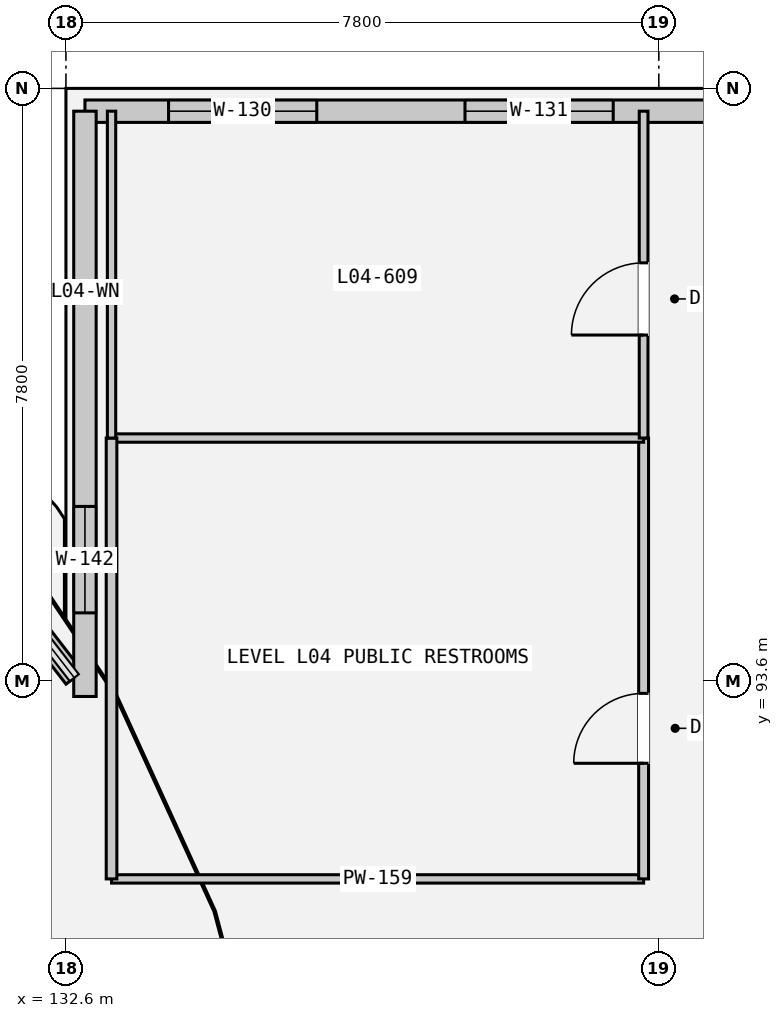
"""IFC4 building model, lengths in metres.
Left out: names, types, materials, properties, quantities, classifications, styles, units other than length and angle.
Written with IfcOpenShell. Run it as: python <this file> out.ifc"""

import sys

from ifc_helpers import new_model, si_unit, direction, frame, frame_2d, origin, place, context, subcontext, project, spatial, rectangle, extrude, element, fill, save


model = new_model("IFC4")
c1 = context("Model", 3, precision=1e-05, world=origin(), true_north=direction((0.0, 1.0)))
c2 = subcontext(c1, "Body", "Model", "MODEL_VIEW")
j1 = project(units=[si_unit("LENGTHUNIT", "METRE"), si_unit("PLANEANGLEUNIT", "RADIAN")], contexts=[c1])
p1 = place(None, origin())
s1 = spatial("IfcSite", under=j1, at=p1, CompositionType="ELEMENT")
p2 = place(p1, origin())
s2 = spatial("IfcBuilding", under=s1, at=p2, CompositionType="ELEMENT")
p3 = place(p2, frame((0.0, 0.0, 19.8)))
s3 = spatial("IfcBuildingStorey", under=s2, at=p3, CompositionType="ELEMENT", Elevation=19.8)
p4 = place(p3, frame((132.71, 93.646, 0.0), z_axis=(0.0, 0.0, 1.0), x_axis=(-0.611576816245, 0.791185059156, 0.0)))
e1 = element("IfcWall", 1, at=p4, inside=s3, PredefinedType="SOLIDWALL", context=c2, shape_type="SweptSolid", body=[
    extrude(rectangle(XDim=4.997, YDim=0.275, at=frame_2d((2.499, 0.0))), origin(), (0.0, 0.0, 1.0), 1.02),
])
p5 = place(p3, frame((132.85, 101.1, 0.0), z_axis=(0.0, 0.0, 1.0), x_axis=(1.0, 0.0, 0.0)))
e2 = element("IfcWall", 2, at=p5, inside=s3, PredefinedType="SOLIDWALL", context=c2, shape_type="SweptSolid", body=[
    extrude(rectangle(XDim=24.05, YDim=0.295, at=frame_2d((12.025, 0.0))), origin(), (0.0, 0.0, 1.0), 3.57),
])
p6 = place(p5, frame((1.1, 0.0, 0.78)))
e3 = element("IfcOpeningElement", 3, at=p6, cuts=e2, PredefinedType="OPENING", context=c2, shape_type="SweptSolid", body=[
    extrude(rectangle(XDim=1.95, YDim=1.8, at=frame_2d((0.975, 0.9))), frame((0.0, 0.157, 0.0), z_axis=(0.0, -1.0, 0.0), x_axis=(1.0, 0.0, 0.0)), (0.0, 0.0, 1.0), 0.315),
])
p7 = place(p5, frame((5.0, 0.0, 0.78)))
e4 = element("IfcOpeningElement", 4, at=p7, cuts=e2, PredefinedType="OPENING", context=c2, shape_type="SweptSolid", body=[
    extrude(rectangle(XDim=1.95, YDim=1.8, at=frame_2d((0.975, 0.9))), frame((0.0, 0.157, 0.0), z_axis=(0.0, -1.0, 0.0), x_axis=(1.0, 0.0, 0.0)), (0.0, 0.0, 1.0), 0.315),
])
p8 = place(p5, frame((8.9, 0.0, 0.78)))
e5 = element("IfcOpeningElement", 5, at=p8, cuts=e2, PredefinedType="OPENING", context=c2, shape_type="SweptSolid", body=[
    extrude(rectangle(XDim=1.95, YDim=1.8, at=frame_2d((0.975, 0.9))), frame((0.0, 0.157, 0.0), z_axis=(0.0, -1.0, 0.0), x_axis=(1.0, 0.0, 0.0)), (0.0, 0.0, 1.0), 0.315),
])
p9 = place(p5, frame((12.8, 0.0, 0.78)))
e6 = element("IfcOpeningElement", 6, at=p9, cuts=e2, PredefinedType="OPENING", context=c2, shape_type="SweptSolid", body=[
    extrude(rectangle(XDim=1.95, YDim=1.8, at=frame_2d((0.975, 0.9))), frame((0.0, 0.157, 0.0), z_axis=(0.0, -1.0, 0.0), x_axis=(1.0, 0.0, 0.0)), (0.0, 0.0, 1.0), 0.315),
])
p10 = place(p5, frame((16.7, 0.0, 0.78)))
e7 = element("IfcOpeningElement", 7, at=p10, cuts=e2, PredefinedType="OPENING", context=c2, shape_type="SweptSolid", body=[
    extrude(rectangle(XDim=1.95, YDim=1.8, at=frame_2d((0.975, 0.9))), frame((0.0, 0.157, 0.0), z_axis=(0.0, -1.0, 0.0), x_axis=(1.0, 0.0, 0.0)), (0.0, 0.0, 1.0), 0.315),
])
p11 = place(p3, frame((132.85, 93.4, 0.0), z_axis=(0.0, 0.0, 1.0), x_axis=(0.0, 1.0, 0.0)))
e8 = element("IfcWall", 8, at=p11, inside=s3, PredefinedType="SOLIDWALL", context=c2, shape_type="SweptSolid", body=[
    extrude(rectangle(XDim=7.7, YDim=0.295, at=frame_2d((3.85, 0.0))), origin(), (0.0, 0.0, 1.0), 3.57),
])
p12 = place(p11, frame((1.1, 0.0, 0.78)))
e9 = element("IfcOpeningElement", 9, at=p12, cuts=e8, PredefinedType="OPENING", context=c2, shape_type="SweptSolid", body=[
    extrude(rectangle(XDim=1.4, YDim=1.4, at=frame_2d((0.7, 0.7))), frame((0.0, 0.157, 0.0), z_axis=(0.0, -1.0, 0.0), x_axis=(1.0, 0.0, 0.0)), (0.0, 0.0, 1.0), 0.315),
])
p13 = place(p3, frame((133.2, 91.0, 0.0), z_axis=(0.0, 0.0, 1.0), x_axis=(1.0, 0.0, 0.0)))
e10 = element("IfcWall", 10, at=p13, inside=s3, PredefinedType="PARTITIONING", context=c2, shape_type="SweptSolid", body=[
    extrude(rectangle(XDim=7.0, YDim=0.11, at=frame_2d((3.5, 0.0))), origin(), (0.0, 0.0, 1.0), 3.45),
])
p14 = place(p3, frame((140.2, 91.0, 0.0), z_axis=(0.0, 0.0, 1.0), x_axis=(0.0, 1.0, 0.0)))
e11 = element("IfcWall", 11, at=p14, inside=s3, PredefinedType="PARTITIONING", context=c2, shape_type="SweptSolid", body=[
    extrude(rectangle(XDim=5.8, YDim=0.13, at=frame_2d((2.9, 0.0))), origin(), (0.0, 0.0, 1.0), 3.45),
])
p15 = place(p14, frame((1.521, 0.0, 0.0)))
e12 = element("IfcOpeningElement", 12, at=p15, cuts=e11, PredefinedType="OPENING", context=c2, shape_type="SweptSolid", body=[
    extrude(rectangle(XDim=0.92, YDim=2.1, at=frame_2d((0.46, 1.05))), frame((0.0, 0.075, 0.0), z_axis=(0.0, -1.0, 0.0), x_axis=(1.0, 0.0, 0.0)), (0.0, 0.0, 1.0), 0.15),
])
p16 = place(p3, frame((140.2, 96.8, 0.0), z_axis=(0.0, 0.0, 1.0), x_axis=(-1.0, 0.0, 0.0)))
e13 = element("IfcWall", 13, at=p16, inside=s3, PredefinedType="PARTITIONING", context=c2, shape_type="SweptSolid", body=[
    extrude(rectangle(XDim=7.0, YDim=0.11, at=frame_2d((3.5, 0.0))), origin(), (0.0, 0.0, 1.0), 3.45),
])
p17 = place(p3, frame((133.2, 96.8, 0.0), z_axis=(0.0, 0.0, 1.0), x_axis=(0.0, -1.0, 0.0)))
e14 = element("IfcWall", 14, at=p17, inside=s3, PredefinedType="PARTITIONING", context=c2, shape_type="SweptSolid", body=[
    extrude(rectangle(XDim=5.8, YDim=0.14, at=frame_2d((2.9, 0.0))), origin(), (0.0, 0.0, 1.0), 3.45),
])
p18 = place(p3, frame((140.2, 96.8, 0.0), z_axis=(0.0, 0.0, 1.0), x_axis=(0.0, 1.0, 0.0)))
e15 = element("IfcWall", 15, at=p18, inside=s3, PredefinedType="PARTITIONING", context=c2, shape_type="SweptSolid", body=[
    extrude(rectangle(XDim=4.3, YDim=0.115, at=frame_2d((2.15, 0.0))), origin(), (0.0, 0.0, 1.0), 3.45),
])
p19 = place(p18, frame((1.355, 0.0, 0.0)))
e16 = element("IfcOpeningElement", 16, at=p19, cuts=e15, PredefinedType="OPENING", context=c2, shape_type="SweptSolid", body=[
    extrude(rectangle(XDim=0.95, YDim=2.1, at=frame_2d((0.475, 1.05))), frame((0.0, 0.067, 0.0), z_axis=(0.0, -1.0, 0.0), x_axis=(1.0, 0.0, 0.0)), (0.0, 0.0, 1.0), 0.135),
])
p20 = place(p3, frame((133.2, 101.1, 0.0), z_axis=(0.0, 0.0, 1.0), x_axis=(0.0, -1.0, 0.0)))
e17 = element("IfcWall", 17, at=p20, inside=s3, PredefinedType="PARTITIONING", context=c2, shape_type="SweptSolid", body=[
    extrude(rectangle(XDim=4.3, YDim=0.11, at=frame_2d((2.15, 0.0))), origin(), (0.0, 0.0, 1.0), 3.45),
])
p21 = place(p6, origin())
e18 = element("IfcWindow", 18, at=p21, inside=s3, PartitioningType="SINGLE_PANEL", PredefinedType="WINDOW", context=c2, shape_type="SweptSolid", body=[
    extrude(rectangle(XDim=1.95, YDim=1.8, at=frame_2d((0.975, 0.9))), frame((0.0, 0.03, 0.0), z_axis=(0.0, -1.0, 0.0), x_axis=(1.0, 0.0, 0.0)), (0.0, 0.0, 1.0), 0.06),
])
fill(e3, e18)
p22 = place(p7, origin())
e19 = element("IfcWindow", 19, at=p22, inside=s3, PartitioningType="SINGLE_PANEL", PredefinedType="WINDOW", context=c2, shape_type="SweptSolid", body=[
    extrude(rectangle(XDim=1.95, YDim=1.8, at=frame_2d((0.975, 0.9))), frame((0.0, 0.03, 0.0), z_axis=(0.0, -1.0, 0.0), x_axis=(1.0, 0.0, 0.0)), (0.0, 0.0, 1.0), 0.06),
])
fill(e4, e19)
p23 = place(p12, origin())
e20 = element("IfcWindow", 20, at=p23, inside=s3, PartitioningType="SINGLE_PANEL", PredefinedType="WINDOW", context=c2, shape_type="SweptSolid", body=[
    extrude(rectangle(XDim=1.4, YDim=1.4, at=frame_2d((0.7, 0.7))), frame((0.0, 0.03, 0.0), z_axis=(0.0, -1.0, 0.0), x_axis=(1.0, 0.0, 0.0)), (0.0, 0.0, 1.0), 0.06),
])
fill(e9, e20)
p24 = place(p15, origin())
e21 = element("IfcDoor", 21, at=p24, inside=s3, OperationType="SINGLE_SWING_LEFT", PredefinedType="DOOR", context=c2, shape_type="SweptSolid", body=[
    extrude(rectangle(XDim=0.92, YDim=2.1, at=frame_2d((0.46, 1.05))), frame((0.0, 0.025, 0.0), z_axis=(0.0, -1.0, 0.0), x_axis=(1.0, 0.0, 0.0)), (0.0, 0.0, 1.0), 0.05),
])
fill(e12, e21)
p25 = place(p19, origin())
e22 = element("IfcDoor", 22, at=p25, inside=s3, OperationType="SINGLE_SWING_RIGHT", PredefinedType="DOOR", context=c2, shape_type="SweptSolid", body=[
    extrude(rectangle(XDim=0.95, YDim=2.1, at=frame_2d((0.475, 1.05))), frame((0.0, 0.025, 0.0), z_axis=(0.0, -1.0, 0.0), x_axis=(1.0, 0.0, 0.0)), (0.0, 0.0, 1.0), 0.05),
])
fill(e16, e22)
save(model, sys.argv[1])
